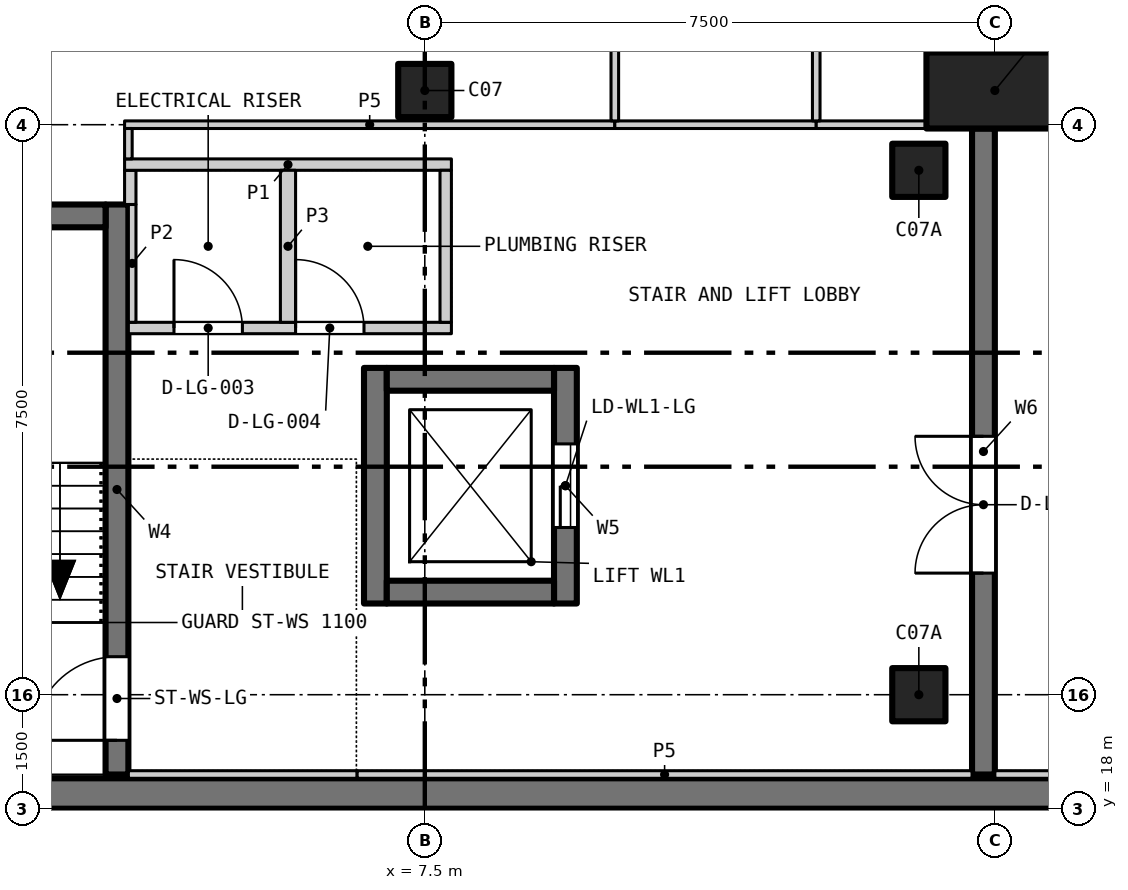
"""IFC4 building model, lengths in metres.
Left out: names, types, materials, properties, quantities, classifications, styles, units other than length and angle.
Written with IfcOpenShell. Run it as: python <this file> out.ifc"""

import sys

from ifc_helpers import new_model, si_unit, direction, frame, frame_2d, origin, origin_2d, place, context, subcontext, project, spatial, rectangle, extrude, element, fill, save


model = new_model("IFC4")
c1 = context("Model", 3, precision=1e-05, world=origin(), true_north=direction((0.0, 1.0)))
c2 = subcontext(c1, "Body", "Model", "MODEL_VIEW")
j1 = project(units=[si_unit("LENGTHUNIT", "METRE"), si_unit("PLANEANGLEUNIT", "RADIAN")], contexts=[c1])
p1 = place(None, origin())
s1 = spatial("IfcSite", under=j1, at=p1, CompositionType="ELEMENT")
p2 = place(p1, origin())
s2 = spatial("IfcBuilding", under=s1, at=p2, CompositionType="ELEMENT")
p3 = place(p2, frame((0.0, 0.0, -5.0)))
s3 = spatial("IfcBuildingStorey", under=s2, at=p3, CompositionType="ELEMENT", Elevation=-5.0)
for number, where, z_axis, x_axis in (
    (1, (7.5, 27.45, 0.0), (0.0, 0.0, 1.0), (1.0, 0.0, 0.0)),
    (2, (14.0, 19.5, 0.0), (0.0, 0.0, 1.0), (1.0, 0.0, 0.0)),
    (3, (14.0, 26.4, 0.0), (0.0, 0.0, 1.0), (1.0, 0.0, 0.0)),
):
    element("IfcColumn", number, at=place(p3, frame(where, z_axis=z_axis, x_axis=x_axis)), inside=s3, PredefinedType="COLUMN", context=c2, shape_type="SweptSolid", body=[
        extrude(rectangle(XDim=0.7, YDim=0.7, at=origin_2d()), origin(), (0.0, 0.0, 1.0), 5.0),
    ])
p4 = place(p3, frame((0.4, 18.2, 0.0), z_axis=(0.0, 0.0, 1.0), x_axis=(1.0, 0.0, 0.0)))
e4 = element("IfcWall", 4, at=p4, inside=s3, PredefinedType="SOLIDWALL", context=c2, shape_type="SweptSolid", body=[
    extrude(rectangle(XDim=57.2, YDim=0.4, at=frame_2d((28.6, 0.0))), origin(), (0.0, 0.0, 1.0), 5.0),
])
p5 = place(p3, frame((14.85, 18.45, 0.0), z_axis=(0.0, 0.0, 1.0), x_axis=(0.0, 1.0, 0.0)))
e5 = element("IfcWall", 5, at=p5, inside=s3, PredefinedType="SOLIDWALL", context=c2, shape_type="SweptSolid", body=[
    extrude(rectangle(XDim=8.5, YDim=0.3, at=frame_2d((4.25, 0.0))), origin(), (0.0, 0.0, 1.0), 5.0),
])
p6 = place(p5, frame((2.65, 0.0, 0.0)))
e6 = element("IfcOpeningElement", 6, at=p6, cuts=e5, PredefinedType="OPENING", context=c2, shape_type="SweptSolid", body=[
    extrude(rectangle(XDim=1.8, YDim=2.1, at=frame_2d((0.9, 1.05))), frame((0.0, 0.16, 0.0), z_axis=(0.0, -1.0, 0.0), x_axis=(1.0, 0.0, 0.0)), (0.0, 0.0, 1.0), 0.32),
])
p7 = place(p3, frame((3.45, 18.45, 0.0), z_axis=(0.0, 0.0, 1.0), x_axis=(0.0, 1.0, 0.0)))
e7 = element("IfcWall", 7, at=p7, inside=s3, PredefinedType="SHEAR", context=c2, shape_type="SweptSolid", body=[
    extrude(rectangle(XDim=7.5, YDim=0.3, at=frame_2d((3.75, 0.0))), origin(), (0.0, 0.0, 1.0), 5.0),
])
p8 = place(p7, frame((0.45, 0.0, 0.0)))
e8 = element("IfcOpeningElement", 8, at=p8, cuts=e7, PredefinedType="OPENING", context=c2, shape_type="SweptSolid", body=[
    extrude(rectangle(XDim=1.1, YDim=2.1, at=frame_2d((0.55, 1.05))), frame((0.0, 0.16, 0.0), z_axis=(0.0, -1.0, 0.0), x_axis=(1.0, 0.0, 0.0)), (0.0, 0.0, 1.0), 0.32),
])
p9 = place(p3, frame((0.3, 25.8, 0.0), z_axis=(0.0, 0.0, 1.0), x_axis=(1.0, 0.0, 0.0)))
e9 = element("IfcWall", 9, at=p9, inside=s3, PredefinedType="SHEAR", context=c2, shape_type="SweptSolid", body=[
    extrude(rectangle(XDim=3.0, YDim=0.3, at=frame_2d((1.5, 0.0))), origin(), (0.0, 0.0, 1.0), 5.0),
])
p10 = place(p3, frame((6.85, 20.7, 0.0), z_axis=(0.0, 0.0, 1.0), x_axis=(0.0, 1.0, 0.0)))
e10 = element("IfcWall", 10, at=p10, inside=s3, PredefinedType="SHEAR", context=c2, shape_type="SweptSolid", body=[
    extrude(rectangle(XDim=3.1, YDim=0.3, at=frame_2d((1.55, 0.0))), origin(), (0.0, 0.0, 1.0), 5.0),
])
p11 = place(p3, frame((9.35, 20.7, 0.0), z_axis=(0.0, 0.0, 1.0), x_axis=(0.0, 1.0, 0.0)))
e11 = element("IfcWall", 11, at=p11, inside=s3, PredefinedType="SHEAR", context=c2, shape_type="SweptSolid", body=[
    extrude(rectangle(XDim=3.1, YDim=0.3, at=frame_2d((1.55, 0.0))), origin(), (0.0, 0.0, 1.0), 5.0),
])
p12 = place(p11, frame((1.0, 0.0, 0.0)))
e12 = element("IfcOpeningElement", 12, at=p12, cuts=e11, PredefinedType="OPENING", context=c2, shape_type="SweptSolid", body=[
    extrude(rectangle(XDim=1.1, YDim=2.1, at=frame_2d((0.55, 1.05))), frame((0.0, 0.16, 0.0), z_axis=(0.0, -1.0, 0.0), x_axis=(1.0, 0.0, 0.0)), (0.0, 0.0, 1.0), 0.32),
])
for number, where, z_axis, x_axis in (
    (13, (7.0, 20.85, 0.0), (0.0, 0.0, 1.0), (1.0, 0.0, 0.0)),
    (14, (7.0, 23.65, 0.0), (0.0, 0.0, 1.0), (1.0, 0.0, 0.0)),
):
    element("IfcWall", number, at=place(p3, frame(where, z_axis=z_axis, x_axis=x_axis)), inside=s3, PredefinedType="SHEAR", context=c2, shape_type="SweptSolid", body=[
        extrude(rectangle(XDim=2.2, YDim=0.3, at=frame_2d((1.1, 0.0))), origin(), (0.0, 0.0, 1.0), 5.0),
    ])
p13 = place(p3, frame((15.0, 27.45, 0.0), z_axis=(0.0, 0.0, 1.0), x_axis=(1.0, 0.0, 0.0)))
e15 = element("IfcColumn", 15, at=p13, inside=s3, PredefinedType="COLUMN", context=c2, shape_type="SweptSolid", body=[
    extrude(rectangle(XDim=1.8, YDim=1.0, at=origin_2d()), origin(), (0.0, 0.0, 1.0), 5.0),
])
p14 = place(p3, frame((3.625, 25.95, 0.0), z_axis=(0.0, 0.0, 1.0), x_axis=(0.0, 1.0, 0.0)))
e16 = element("IfcWall", 16, at=p14, inside=s3, PredefinedType="PARTITIONING", context=c2, shape_type="SweptSolid", body=[
    extrude(rectangle(XDim=0.45, YDim=0.15, at=frame_2d((0.225, 0.0))), origin(), (0.0, 0.0, 1.0), 4.7),
])
p15 = place(p3, frame((3.55, 26.475, 0.0), z_axis=(0.0, 0.0, 1.0), x_axis=(1.0, 0.0, 0.0)))
e17 = element("IfcWall", 17, at=p15, inside=s3, PredefinedType="PARTITIONING", context=c2, shape_type="SweptSolid", body=[
    extrude(rectangle(XDim=4.3, YDim=0.15, at=frame_2d((2.15, 0.0))), origin(), (0.0, 0.0, 1.0), 3.3),
])
p16 = place(p3, frame((3.6, 24.325, 0.0), z_axis=(0.0, 0.0, 1.0), x_axis=(1.0, 0.0, 0.0)))
e18 = element("IfcWall", 18, at=p16, inside=s3, PredefinedType="PARTITIONING", context=c2, shape_type="SweptSolid", body=[
    extrude(rectangle(XDim=4.25, YDim=0.15, at=frame_2d((2.125, 0.0))), origin(), (0.0, 0.0, 1.0), 4.7),
])
p17 = place(p16, frame((0.6, 0.0, 0.0)))
e19 = element("IfcOpeningElement", 19, at=p17, cuts=e18, PredefinedType="OPENING", context=c2, shape_type="SweptSolid", body=[
    extrude(rectangle(XDim=0.9, YDim=2.1, at=frame_2d((0.45, 1.05))), frame((0.0, 0.085, 0.0), z_axis=(0.0, -1.0, 0.0), x_axis=(1.0, 0.0, 0.0)), (0.0, 0.0, 1.0), 0.17),
])
p18 = place(p16, frame((2.2, 0.0, 0.0)))
e20 = element("IfcOpeningElement", 20, at=p18, cuts=e18, PredefinedType="OPENING", context=c2, shape_type="SweptSolid", body=[
    extrude(rectangle(XDim=0.9, YDim=2.1, at=frame_2d((0.45, 1.05))), frame((0.0, 0.085, 0.0), z_axis=(0.0, -1.0, 0.0), x_axis=(1.0, 0.0, 0.0)), (0.0, 0.0, 1.0), 0.17),
])
p19 = place(p3, frame((3.65, 24.4, 0.0), z_axis=(0.0, 0.0, 1.0), x_axis=(0.0, 1.0, 0.0)))
e21 = element("IfcWall", 21, at=p19, inside=s3, PredefinedType="PARTITIONING", context=c2, shape_type="SweptSolid", body=[
    extrude(rectangle(XDim=1.55, YDim=0.1, at=frame_2d((0.775, 0.0))), origin(), (0.0, 0.0, 1.0), 4.7),
])
p20 = place(p3, frame((5.7, 24.4, 0.0), z_axis=(0.0, 0.0, 1.0), x_axis=(0.0, 1.0, 0.0)))
e22 = element("IfcWall", 22, at=p20, inside=s3, PredefinedType="PARTITIONING", context=c2, shape_type="SweptSolid", body=[
    extrude(rectangle(XDim=2.0, YDim=0.2, at=frame_2d((1.0, 0.0))), origin(), (0.0, 0.0, 1.0), 4.7),
])
p21 = place(p3, frame((7.775, 24.4, 0.0), z_axis=(0.0, 0.0, 1.0), x_axis=(0.0, 1.0, 0.0)))
e23 = element("IfcWall", 23, at=p21, inside=s3, PredefinedType="PARTITIONING", context=c2, shape_type="SweptSolid", body=[
    extrude(rectangle(XDim=2.0, YDim=0.15, at=frame_2d((1.0, 0.0))), origin(), (0.0, 0.0, 1.0), 4.7),
])
p22 = place(p3, frame((3.6, 18.45, 0.0), z_axis=(0.0, 0.0, 1.0), x_axis=(1.0, 0.0, 0.0)))
e24 = element("IfcWall", 24, at=p22, inside=s3, PredefinedType="PARTITIONING", context=c2, shape_type="SweptSolid", body=[
    extrude(rectangle(XDim=3.01, YDim=0.1, at=frame_2d((1.505, 0.0))), origin(), (0.0, 0.0, 1.0), 4.7),
])
p23 = place(p3, frame((6.61, 18.45, 0.0), z_axis=(0.0, 0.0, 1.0), x_axis=(1.0, 0.0, 0.0)))
e25 = element("IfcWall", 25, at=p23, inside=s3, PredefinedType="PARTITIONING", context=c2, shape_type="SweptSolid", body=[
    extrude(rectangle(XDim=8.09, YDim=0.1, at=frame_2d((4.045, 0.0))), origin(), (0.0, 0.0, 1.0), 4.7),
])
p24 = place(p3, frame((15.0, 18.45, 0.0), z_axis=(0.0, 0.0, 1.0), x_axis=(1.0, 0.0, 0.0)))
e26 = element("IfcWall", 26, at=p24, inside=s3, PredefinedType="PARTITIONING", context=c2, shape_type="SweptSolid", body=[
    extrude(rectangle(XDim=28.0, YDim=0.1, at=frame_2d((14.0, 0.0))), origin(), (0.0, 0.0, 1.0), 4.65),
])
p25 = place(p3, frame((3.55, 27.0, 0.0), z_axis=(0.0, 0.0, 1.0), x_axis=(1.0, 0.0, 0.0)))
e27 = element("IfcWall", 27, at=p25, inside=s3, PredefinedType="PARTITIONING", context=c2, shape_type="SweptSolid", body=[
    extrude(rectangle(XDim=6.45, YDim=0.1, at=frame_2d((3.225, 0.0))), origin(), (0.0, 0.0, 1.0), 4.7),
])
p26 = place(p3, frame((10.0, 27.0, 0.0), z_axis=(0.0, 0.0, 1.0), x_axis=(1.0, 0.0, 0.0)))
e28 = element("IfcWall", 28, at=p26, inside=s3, PredefinedType="PARTITIONING", context=c2, shape_type="SweptSolid", body=[
    extrude(rectangle(XDim=2.65, YDim=0.1, at=frame_2d((1.325, 0.0))), origin(), (0.0, 0.0, 1.0), 4.7),
])
p27 = place(p3, frame((12.65, 27.0, 0.0), z_axis=(0.0, 0.0, 1.0), x_axis=(1.0, 0.0, 0.0)))
e29 = element("IfcWall", 29, at=p27, inside=s3, PredefinedType="PARTITIONING", context=c2, shape_type="SweptSolid", body=[
    extrude(rectangle(XDim=1.45, YDim=0.1, at=frame_2d((0.725, 0.0))), origin(), (0.0, 0.0, 1.0), 4.7),
])
p28 = place(p3, frame((3.6, 26.55, 0.0), z_axis=(0.0, 0.0, 1.0), x_axis=(0.0, 1.0, 0.0)))
e30 = element("IfcWall", 30, at=p28, inside=s3, PredefinedType="PARTITIONING", context=c2, shape_type="SweptSolid", body=[
    extrude(rectangle(XDim=0.4, YDim=0.1, at=frame_2d((0.2, 0.0))), origin(), (0.0, 0.0, 1.0), 4.7),
])
for number, where, z_axis, x_axis in (
    (31, (10.0, 27.05, 0.0), (0.0, 0.0, 1.0), (0.0, 1.0, 0.0)),
    (32, (12.65, 27.05, 0.0), (0.0, 0.0, 1.0), (0.0, 1.0, 0.0)),
):
    element("IfcWall", number, at=place(p3, frame(where, z_axis=z_axis, x_axis=x_axis)), inside=s3, PredefinedType="PARTITIONING", context=c2, shape_type="SweptSolid", body=[
        extrude(rectangle(XDim=1.95, YDim=0.1, at=frame_2d((0.975, 0.0))), origin(), (0.0, 0.0, 1.0), 4.7),
    ])
p29 = place(p3, frame((15.0, 27.95, 0.0), z_axis=(0.0, 0.0, 1.0), x_axis=(0.0, 1.0, 0.0)))
e33 = element("IfcWall", 33, at=p29, inside=s3, PredefinedType="PARTITIONING", context=c2, shape_type="SweptSolid", body=[
    extrude(rectangle(XDim=0.988, YDim=0.1, at=frame_2d((0.494, 0.0))), origin(), (0.0, 0.0, 1.0), 4.65),
])
p30 = place(p6, origin())
e34 = element("IfcDoor", 34, at=p30, inside=s3, OperationType="DOUBLE_DOOR_SINGLE_SWING", PredefinedType="DOOR", context=c2, shape_type="SweptSolid", body=[
    extrude(rectangle(XDim=1.8, YDim=2.1, at=frame_2d((0.9, 1.05))), frame((0.0, 0.025, 0.0), z_axis=(0.0, -1.0, 0.0), x_axis=(1.0, 0.0, 0.0)), (0.0, 0.0, 1.0), 0.05),
])
fill(e6, e34)
p31 = place(p17, origin())
e35 = element("IfcDoor", 35, at=p31, inside=s3, OperationType="SINGLE_SWING_LEFT", PredefinedType="DOOR", context=c2, shape_type="SweptSolid", body=[
    extrude(rectangle(XDim=0.9, YDim=2.1, at=frame_2d((0.45, 1.05))), frame((0.0, 0.025, 0.0), z_axis=(0.0, -1.0, 0.0), x_axis=(1.0, 0.0, 0.0)), (0.0, 0.0, 1.0), 0.05),
])
fill(e19, e35)
p32 = place(p18, origin())
e36 = element("IfcDoor", 36, at=p32, inside=s3, OperationType="SINGLE_SWING_LEFT", PredefinedType="DOOR", context=c2, shape_type="SweptSolid", body=[
    extrude(rectangle(XDim=0.9, YDim=2.1, at=frame_2d((0.45, 1.05))), frame((0.0, 0.025, 0.0), z_axis=(0.0, -1.0, 0.0), x_axis=(1.0, 0.0, 0.0)), (0.0, 0.0, 1.0), 0.05),
])
fill(e20, e36)
p33 = place(p8, origin())
e37 = element("IfcDoor", 37, at=p33, inside=s3, OperationType="SINGLE_SWING_LEFT", PredefinedType="DOOR", context=c2, shape_type="SweptSolid", body=[
    extrude(rectangle(XDim=1.1, YDim=2.1, at=frame_2d((0.55, 1.05))), frame((0.0, 0.025, 0.0), z_axis=(0.0, -1.0, 0.0), x_axis=(1.0, 0.0, 0.0)), (0.0, 0.0, 1.0), 0.05),
])
fill(e8, e37)
p34 = place(p12, origin())
e38 = element("IfcDoor", 38, at=p34, inside=s3, OperationType="SLIDING_TO_LEFT", PredefinedType="DOOR", context=c2, shape_type="SweptSolid", body=[
    extrude(rectangle(XDim=1.1, YDim=2.1, at=frame_2d((0.55, 1.05))), frame((0.0, 0.025, 0.0), z_axis=(0.0, -1.0, 0.0), x_axis=(1.0, 0.0, 0.0)), (0.0, 0.0, 1.0), 0.05),
])
fill(e12, e38)
save(model, sys.argv[1])
